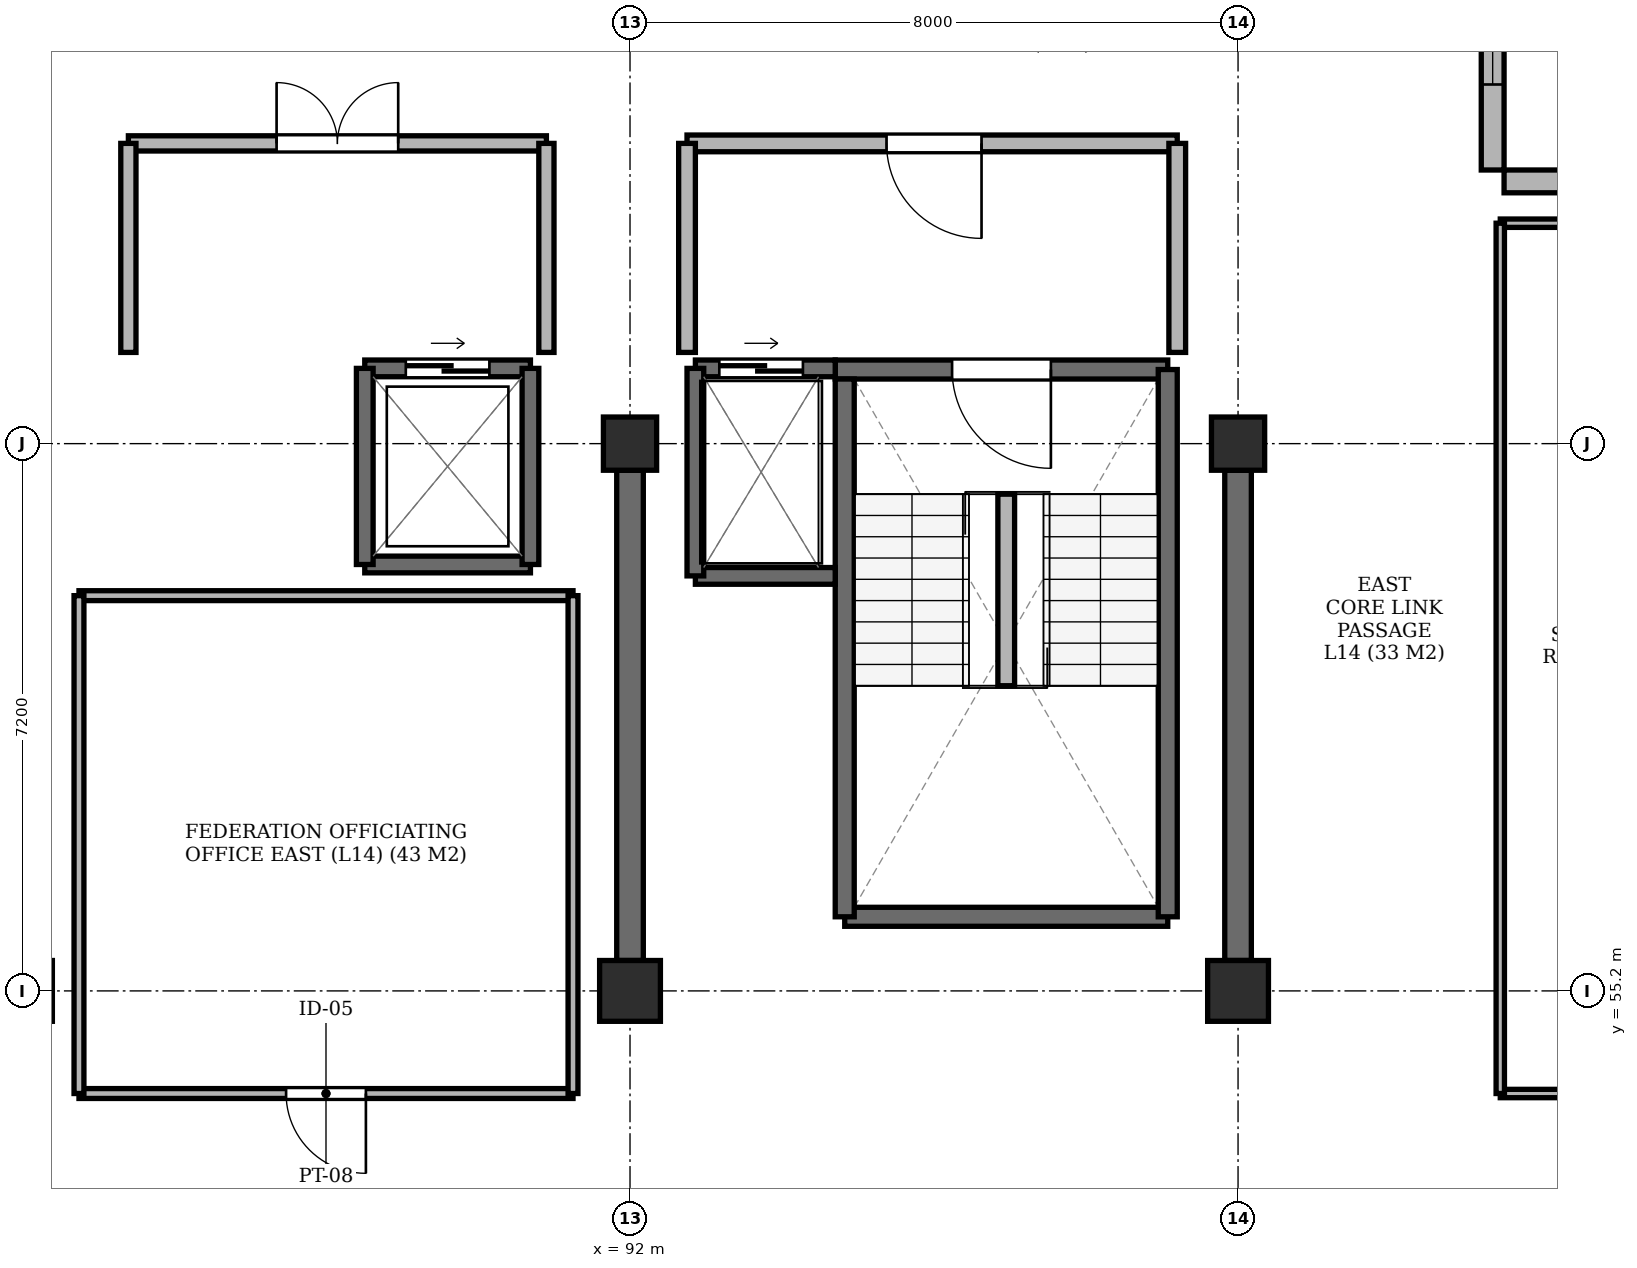
"""IFC4 building model, lengths in metres.
Left out: names, types, materials, properties, quantities, classifications, styles, units other than length and angle.
Written with IfcOpenShell. Run it as: python <this file> out.ifc"""

import sys

from ifc_helpers import new_model, si_unit, direction, frame, frame_2d, origin, origin_2d, place, context, subcontext, project, spatial, rectangle, extrude, element, fill, save


model = new_model("IFC4")
c1 = context("Model", 3, precision=1e-05, world=origin(), true_north=direction((0.0, 1.0)))
c2 = subcontext(c1, "Body", "Model", "MODEL_VIEW")
j1 = project(units=[si_unit("LENGTHUNIT", "METRE"), si_unit("PLANEANGLEUNIT", "RADIAN")], contexts=[c1])
p1 = place(None, origin())
s1 = spatial("IfcSite", under=j1, at=p1, CompositionType="ELEMENT")
p2 = place(p1, origin())
s2 = spatial("IfcBuilding", under=s1, at=p2, CompositionType="ELEMENT")
p3 = place(p2, frame((0.0, 0.0, 56.8)))
s3 = spatial("IfcBuildingStorey", under=s2, at=p3, CompositionType="ELEMENT", Elevation=56.8)
for number, where, z_axis, x_axis in (
    (1, (84.0, 55.2, -0.22), (0.0, 0.0, 1.0), (1.0, 0.0, 0.0)),
    (2, (92.0, 55.2, -0.22), (0.0, 0.0, 1.0), (1.0, 0.0, 0.0)),
):
    element("IfcColumn", number, at=place(p3, frame(where, z_axis=z_axis, x_axis=x_axis)), inside=s3, PredefinedType="COLUMN", context=c2, shape_type="SweptSolid", body=[
        extrude(rectangle(XDim=0.8, YDim=0.8, at=origin_2d()), origin(), (0.0, 0.0, 1.0), 3.26),
    ])
p4 = place(p3, frame((92.0, 62.4, -0.22), z_axis=(0.0, 0.0, 1.0), x_axis=(1.0, 0.0, 0.0)))
e3 = element("IfcColumn", 3, at=p4, inside=s3, PredefinedType="COLUMN", context=c2, shape_type="SweptSolid", body=[
    extrude(rectangle(XDim=0.7, YDim=0.7, at=origin_2d()), origin(), (0.0, 0.0, 1.0), 3.26),
])
p5 = place(p3, frame((100.0, 55.2, -0.22), z_axis=(0.0, 0.0, 1.0), x_axis=(1.0, 0.0, 0.0)))
e4 = element("IfcColumn", 4, at=p5, inside=s3, PredefinedType="COLUMN", context=c2, shape_type="SweptSolid", body=[
    extrude(rectangle(XDim=0.8, YDim=0.8, at=origin_2d()), origin(), (0.0, 0.0, 1.0), 3.26),
])
p6 = place(p3, frame((100.0, 62.4, -0.22), z_axis=(0.0, 0.0, 1.0), x_axis=(1.0, 0.0, 0.0)))
e5 = element("IfcColumn", 5, at=p6, inside=s3, PredefinedType="COLUMN", context=c2, shape_type="SweptSolid", body=[
    extrude(rectangle(XDim=0.7, YDim=0.7, at=origin_2d()), origin(), (0.0, 0.0, 1.0), 3.26),
])
for number, where, z_axis, x_axis in (
    (6, (92.0, 55.6, 0.0), (0.0, 0.0, 1.0), (0.0, 1.0, 0.0)),
    (7, (100.0, 55.6, 0.0), (0.0, 0.0, 1.0), (0.0, 1.0, 0.0)),
):
    element("IfcWall", number, at=place(p3, frame(where, z_axis=z_axis, x_axis=x_axis)), inside=s3, PredefinedType="SHEAR", context=c2, shape_type="SweptSolid", body=[
        extrude(rectangle(XDim=6.45, YDim=0.35, at=frame_2d((3.225, 0.0))), origin(), (0.0, 0.0, 1.0), 3.04),
    ])
p7 = place(p3, frame((108.0, 65.85, 0.0), z_axis=(0.0, 0.0, 1.0), x_axis=(-1.0, 0.0, 0.0)))
e8 = element("IfcWall", 8, at=p7, inside=s3, PredefinedType="SOLIDWALL", context=c2, shape_type="SweptSolid", body=[
    extrude(rectangle(XDim=4.5, YDim=0.3, at=frame_2d((2.25, 0.0))), origin(), (0.0, 0.0, 1.0), 2.53),
])
p8 = place(p7, frame((1.525, 0.0, 0.62)))
e9 = element("IfcOpeningElement", 9, at=p8, cuts=e8, PredefinedType="OPENING", context=c2, shape_type="SweptSolid", body=[
    extrude(rectangle(XDim=1.45, YDim=1.81, at=frame_2d((0.725, 0.905))), frame((0.0, 0.162, 0.0), z_axis=(0.0, -1.0, 0.0), x_axis=(1.0, 0.0, 0.0)), (0.0, 0.0, 1.0), 0.324),
])
p9 = place(p3, frame((103.35, 66.0, 0.0), z_axis=(0.0, 0.0, 1.0), x_axis=(0.0, 1.0, 0.0)))
e10 = element("IfcWall", 10, at=p9, inside=s3, PredefinedType="SOLIDWALL", context=c2, shape_type="SweptSolid", body=[
    extrude(rectangle(XDim=3.6, YDim=0.3, at=frame_2d((1.8, 0.0))), origin(), (0.0, 0.0, 1.0), 2.53),
])
p10 = place(p9, frame((1.125, 0.0, 0.62)))
e11 = element("IfcOpeningElement", 11, at=p10, cuts=e10, PredefinedType="OPENING", context=c2, shape_type="SweptSolid", body=[
    extrude(rectangle(XDim=1.35, YDim=1.8, at=frame_2d((0.675, 0.9))), frame((0.0, 0.162, 0.0), z_axis=(0.0, -1.0, 0.0), x_axis=(1.0, 0.0, 0.0)), (0.0, 0.0, 1.0), 0.324),
])
p11 = place(p3, frame((94.825, 56.175, 0.0), z_axis=(0.0, 0.0, 1.0), x_axis=(1.0, 0.0, 0.0)))
e12 = element("IfcWall", 12, at=p11, inside=s3, PredefinedType="SHEAR", context=c2, shape_type="SweptSolid", body=[
    extrude(rectangle(XDim=4.25, YDim=0.25, at=frame_2d((2.125, 0.0))), origin(), (0.0, 0.0, 1.0), 3.04),
])
p12 = place(p3, frame((99.075, 63.375, 0.0), z_axis=(0.0, 0.0, 1.0), x_axis=(-1.0, 0.0, 0.0)))
e13 = element("IfcWall", 13, at=p12, inside=s3, PredefinedType="SHEAR", context=c2, shape_type="SweptSolid", body=[
    extrude(rectangle(XDim=4.375, YDim=0.25, at=frame_2d((2.188, 0.0))), origin(), (0.0, 0.0, 1.0), 3.04),
])
p13 = place(p12, frame((1.538, 0.0, 0.0)))
e14 = element("IfcOpeningElement", 14, at=p13, cuts=e13, PredefinedType="OPENING", context=c2, shape_type="SweptSolid", body=[
    extrude(rectangle(XDim=1.3, YDim=2.2, at=frame_2d((0.65, 1.1))), frame((0.0, 0.137, 0.0), z_axis=(0.0, -1.0, 0.0), x_axis=(1.0, 0.0, 0.0)), (0.0, 0.0, 1.0), 0.274),
])
p14 = place(p3, frame((94.825, 63.25, 0.0), z_axis=(0.0, 0.0, 1.0), x_axis=(0.0, -1.0, 0.0)))
e15 = element("IfcWall", 15, at=p14, inside=s3, PredefinedType="SHEAR", context=c2, shape_type="SweptSolid", body=[
    extrude(rectangle(XDim=7.075, YDim=0.25, at=frame_2d((3.538, 0.0))), origin(), (0.0, 0.0, 1.0), 3.04),
])
p15 = place(p3, frame((99.075, 56.175, 0.0), z_axis=(0.0, 0.0, 1.0), x_axis=(0.0, 1.0, 0.0)))
e16 = element("IfcWall", 16, at=p15, inside=s3, PredefinedType="SHEAR", context=c2, shape_type="SweptSolid", body=[
    extrude(rectangle(XDim=7.2, YDim=0.25, at=frame_2d((3.6, 0.0))), origin(), (0.0, 0.0, 1.0), 3.04),
])
p16 = place(p3, frame((96.95, 59.215, 0.0), z_axis=(0.0, 0.0, 1.0), x_axis=(0.0, 1.0, 0.0)))
e17 = element("IfcWall", 17, at=p16, inside=s3, PredefinedType="PARTITIONING", context=c2, shape_type="SweptSolid", body=[
    extrude(rectangle(XDim=2.52, YDim=0.22, at=frame_2d((1.26, 0.0))), origin(), (0.0, 0.0, 1.0), 3.04),
])
p17 = place(p3, frame((92.86, 60.66, 0.0), z_axis=(0.0, 0.0, 1.0), x_axis=(1.0, 0.0, 0.0)))
e18 = element("IfcWall", 18, at=p17, inside=s3, PredefinedType="SHEAR", context=c2, shape_type="SweptSolid", body=[
    extrude(rectangle(XDim=1.84, YDim=0.22, at=frame_2d((0.92, 0.0))), origin(), (0.0, 0.0, 1.0), 3.04),
])
p18 = place(p3, frame((94.7, 63.39, 0.0), z_axis=(0.0, 0.0, 1.0), x_axis=(-1.0, 0.0, 0.0)))
e19 = element("IfcWall", 19, at=p18, inside=s3, PredefinedType="SHEAR", context=c2, shape_type="SweptSolid", body=[
    extrude(rectangle(XDim=1.84, YDim=0.22, at=frame_2d((0.92, 0.0))), origin(), (0.0, 0.0, 1.0), 3.04),
])
p19 = place(p18, frame((0.425, 0.0, 0.0)))
e20 = element("IfcOpeningElement", 20, at=p19, cuts=e19, PredefinedType="OPENING", context=c2, shape_type="SweptSolid", body=[
    extrude(rectangle(XDim=1.1, YDim=2.2, at=frame_2d((0.55, 1.1))), frame((0.0, 0.122, 0.0), z_axis=(0.0, -1.0, 0.0), x_axis=(1.0, 0.0, 0.0)), (0.0, 0.0, 1.0), 0.244),
])
p20 = place(p3, frame((92.86, 63.39, 0.0), z_axis=(0.0, 0.0, 1.0), x_axis=(0.0, -1.0, 0.0)))
e21 = element("IfcWall", 21, at=p20, inside=s3, PredefinedType="SHEAR", context=c2, shape_type="SweptSolid", body=[
    extrude(rectangle(XDim=2.73, YDim=0.22, at=frame_2d((1.365, 0.0))), origin(), (0.0, 0.0, 1.0), 3.04),
])
p21 = place(p3, frame((88.51, 60.81, 0.0), z_axis=(0.0, 0.0, 1.0), x_axis=(1.0, 0.0, 0.0)))
e22 = element("IfcWall", 22, at=p21, inside=s3, PredefinedType="SHEAR", context=c2, shape_type="SweptSolid", body=[
    extrude(rectangle(XDim=2.18, YDim=0.22, at=frame_2d((1.09, 0.0))), origin(), (0.0, 0.0, 1.0), 3.04),
])
p22 = place(p3, frame((90.69, 63.39, 0.0), z_axis=(0.0, 0.0, 1.0), x_axis=(-1.0, 0.0, 0.0)))
e23 = element("IfcWall", 23, at=p22, inside=s3, PredefinedType="SHEAR", context=c2, shape_type="SweptSolid", body=[
    extrude(rectangle(XDim=2.18, YDim=0.22, at=frame_2d((1.09, 0.0))), origin(), (0.0, 0.0, 1.0), 3.04),
])
p23 = place(p22, frame((0.54, 0.0, 0.0)))
e24 = element("IfcOpeningElement", 24, at=p23, cuts=e23, PredefinedType="OPENING", context=c2, shape_type="SweptSolid", body=[
    extrude(rectangle(XDim=1.1, YDim=2.2, at=frame_2d((0.55, 1.1))), frame((0.0, 0.122, 0.0), z_axis=(0.0, -1.0, 0.0), x_axis=(1.0, 0.0, 0.0)), (0.0, 0.0, 1.0), 0.244),
])
for number, where, z_axis, x_axis in (
    (25, (88.51, 63.39, 0.0), (0.0, 0.0, 1.0), (0.0, -1.0, 0.0)),
    (26, (90.69, 60.81, 0.0), (0.0, 0.0, 1.0), (0.0, 1.0, 0.0)),
):
    element("IfcWall", number, at=place(p3, frame(where, z_axis=z_axis, x_axis=x_axis)), inside=s3, PredefinedType="SHEAR", context=c2, shape_type="SweptSolid", body=[
        extrude(rectangle(XDim=2.58, YDim=0.22, at=frame_2d((1.29, 0.0))), origin(), (0.0, 0.0, 1.0), 3.04),
    ])
p24 = place(p3, frame((92.75, 66.35, 0.0), z_axis=(0.0, 0.0, 1.0), x_axis=(1.0, 0.0, 0.0)))
e27 = element("IfcWall", 27, at=p24, inside=s3, PredefinedType="PARTITIONING", context=c2, shape_type="SweptSolid", body=[
    extrude(rectangle(XDim=6.45, YDim=0.22, at=frame_2d((3.225, 0.0))), origin(), (0.0, 0.0, 1.0), 2.53),
])
p25 = place(p24, frame((2.625, 0.0, 0.0)))
e28 = element("IfcOpeningElement", 28, at=p25, cuts=e27, PredefinedType="OPENING", context=c2, shape_type="SweptSolid", body=[
    extrude(rectangle(XDim=1.25, YDim=2.2, at=frame_2d((0.625, 1.1))), frame((0.0, 0.122, 0.0), z_axis=(0.0, -1.0, 0.0), x_axis=(1.0, 0.0, 0.0)), (0.0, 0.0, 1.0), 0.244),
])
for number, where, z_axis, x_axis in (
    (29, (92.75, 63.6, 0.0), (0.0, 0.0, 1.0), (0.0, 1.0, 0.0)),
    (30, (99.2, 63.6, 0.0), (0.0, 0.0, 1.0), (0.0, 1.0, 0.0)),
):
    element("IfcWall", number, at=place(p3, frame(where, z_axis=z_axis, x_axis=x_axis)), inside=s3, PredefinedType="PARTITIONING", context=c2, shape_type="SweptSolid", body=[
        extrude(rectangle(XDim=2.75, YDim=0.22, at=frame_2d((1.375, 0.0))), origin(), (0.0, 0.0, 1.0), 2.53),
    ])
p26 = place(p3, frame((85.4, 66.35, 0.0), z_axis=(0.0, 0.0, 1.0), x_axis=(1.0, 0.0, 0.0)))
e31 = element("IfcWall", 31, at=p26, inside=s3, PredefinedType="PARTITIONING", context=c2, shape_type="SweptSolid", body=[
    extrude(rectangle(XDim=5.5, YDim=0.2, at=frame_2d((2.75, 0.0))), origin(), (0.0, 0.0, 1.0), 2.53),
])
p27 = place(p26, frame((1.95, 0.0, 0.0)))
e32 = element("IfcOpeningElement", 32, at=p27, cuts=e31, PredefinedType="OPENING", context=c2, shape_type="SweptSolid", body=[
    extrude(rectangle(XDim=1.6, YDim=2.2, at=frame_2d((0.8, 1.1))), frame((0.0, 0.112, 0.0), z_axis=(0.0, -1.0, 0.0), x_axis=(1.0, 0.0, 0.0)), (0.0, 0.0, 1.0), 0.224),
])
for number, where, z_axis, x_axis in (
    (33, (85.4, 63.6, 0.0), (0.0, 0.0, 1.0), (0.0, 1.0, 0.0)),
    (34, (90.9, 63.6, 0.0), (0.0, 0.0, 1.0), (0.0, 1.0, 0.0)),
):
    element("IfcWall", number, at=place(p3, frame(where, z_axis=z_axis, x_axis=x_axis)), inside=s3, PredefinedType="PARTITIONING", context=c2, shape_type="SweptSolid", body=[
        extrude(rectangle(XDim=2.75, YDim=0.2, at=frame_2d((1.375, 0.0))), origin(), (0.0, 0.0, 1.0), 2.53),
    ])
p28 = place(p3, frame((103.45, 53.85, 0.0), z_axis=(0.0, 0.0, 1.0), x_axis=(1.0, 0.0, 0.0)))
e35 = element("IfcWall", 35, at=p28, inside=s3, PredefinedType="PARTITIONING", context=c2, shape_type="SweptSolid", body=[
    extrude(rectangle(XDim=3.75, YDim=0.11, at=frame_2d((1.875, 0.0))), origin(), (0.0, 0.0, 1.0), 2.53),
])
p29 = place(p28, frame((1.3, 0.0, 0.0)))
e36 = element("IfcOpeningElement", 36, at=p29, cuts=e35, PredefinedType="OPENING", context=c2, shape_type="SweptSolid", body=[
    extrude(rectangle(XDim=1.1, YDim=2.15, at=frame_2d((0.55, 1.075))), frame((0.0, 0.067, 0.0), z_axis=(0.0, -1.0, 0.0), x_axis=(1.0, 0.0, 0.0)), (0.0, 0.0, 1.0), 0.134),
])
p30 = place(p3, frame((103.45, 65.3, 0.0), z_axis=(0.0, 0.0, 1.0), x_axis=(1.0, 0.0, 0.0)))
e37 = element("IfcWall", 37, at=p30, inside=s3, PredefinedType="PARTITIONING", context=c2, shape_type="SweptSolid", body=[
    extrude(rectangle(XDim=3.75, YDim=0.11, at=frame_2d((1.875, 0.0))), origin(), (0.0, 0.0, 1.0), 2.53),
])
p31 = place(p3, frame((103.45, 53.85, 0.0), z_axis=(0.0, 0.0, 1.0), x_axis=(0.0, 1.0, 0.0)))
e38 = element("IfcWall", 38, at=p31, inside=s3, PredefinedType="PARTITIONING", context=c2, shape_type="SweptSolid", body=[
    extrude(rectangle(XDim=11.45, YDim=0.11, at=frame_2d((5.725, 0.0))), origin(), (0.0, 0.0, 1.0), 2.53),
])
p32 = place(p3, frame((84.75, 53.85, 0.0), z_axis=(0.0, 0.0, 1.0), x_axis=(1.0, 0.0, 0.0)))
e39 = element("IfcWall", 39, at=p32, inside=s3, PredefinedType="PARTITIONING", context=c2, shape_type="SweptSolid", body=[
    extrude(rectangle(XDim=6.5, YDim=0.13, at=frame_2d((3.25, 0.0))), origin(), (0.0, 0.0, 1.0), 2.53),
])
p33 = place(p32, frame((2.725, 0.0, 0.0)))
e40 = element("IfcOpeningElement", 40, at=p33, cuts=e39, PredefinedType="OPENING", context=c2, shape_type="SweptSolid", body=[
    extrude(rectangle(XDim=1.05, YDim=2.15, at=frame_2d((0.525, 1.075))), frame((0.0, 0.077, 0.0), z_axis=(0.0, -1.0, 0.0), x_axis=(1.0, 0.0, 0.0)), (0.0, 0.0, 1.0), 0.154),
])
p34 = place(p3, frame((84.75, 60.4, 0.0), z_axis=(0.0, 0.0, 1.0), x_axis=(1.0, 0.0, 0.0)))
e41 = element("IfcWall", 41, at=p34, inside=s3, PredefinedType="PARTITIONING", context=c2, shape_type="SweptSolid", body=[
    extrude(rectangle(XDim=6.5, YDim=0.13, at=frame_2d((3.25, 0.0))), origin(), (0.0, 0.0, 1.0), 2.53),
])
for number, where, z_axis, x_axis in (
    (42, (84.75, 53.85, 0.0), (0.0, 0.0, 1.0), (0.0, 1.0, 0.0)),
    (43, (91.25, 53.85, 0.0), (0.0, 0.0, 1.0), (0.0, 1.0, 0.0)),
):
    element("IfcWall", number, at=place(p3, frame(where, z_axis=z_axis, x_axis=x_axis)), inside=s3, PredefinedType="PARTITIONING", context=c2, shape_type="SweptSolid", body=[
        extrude(rectangle(XDim=6.55, YDim=0.13, at=frame_2d((3.275, 0.0))), origin(), (0.0, 0.0, 1.0), 2.53),
    ])
p35 = place(p10, origin())
e44 = element("IfcWindow", 44, at=p35, inside=s3, PartitioningType="SINGLE_PANEL", PredefinedType="WINDOW", context=c2, shape_type="SweptSolid", body=[
    extrude(rectangle(XDim=1.35, YDim=1.8, at=frame_2d((0.675, 0.9))), frame((0.0, 0.03, 0.0), z_axis=(0.0, -1.0, 0.0), x_axis=(1.0, 0.0, 0.0)), (0.0, 0.0, 1.0), 0.06),
])
fill(e11, e44)
p36 = place(p13, origin())
e45 = element("IfcDoor", 45, at=p36, inside=s3, OperationType="SINGLE_SWING_LEFT", PredefinedType="DOOR", context=c2, shape_type="SweptSolid", body=[
    extrude(rectangle(XDim=1.3, YDim=2.2, at=frame_2d((0.65, 1.1))), frame((0.0, 0.025, 0.0), z_axis=(0.0, -1.0, 0.0), x_axis=(1.0, 0.0, 0.0)), (0.0, 0.0, 1.0), 0.05),
])
fill(e14, e45)
p37 = place(p19, origin())
e46 = element("IfcDoor", 46, at=p37, inside=s3, OperationType="SLIDING_TO_LEFT", PredefinedType="DOOR", context=c2, shape_type="SweptSolid", body=[
    extrude(rectangle(XDim=1.1, YDim=2.2, at=frame_2d((0.55, 1.1))), frame((0.0, 0.025, 0.0), z_axis=(0.0, -1.0, 0.0), x_axis=(1.0, 0.0, 0.0)), (0.0, 0.0, 1.0), 0.05),
])
fill(e20, e46)
p38 = place(p23, origin())
e47 = element("IfcDoor", 47, at=p38, inside=s3, OperationType="SLIDING_TO_LEFT", PredefinedType="DOOR", context=c2, shape_type="SweptSolid", body=[
    extrude(rectangle(XDim=1.1, YDim=2.2, at=frame_2d((0.55, 1.1))), frame((0.0, 0.025, 0.0), z_axis=(0.0, -1.0, 0.0), x_axis=(1.0, 0.0, 0.0)), (0.0, 0.0, 1.0), 0.05),
])
fill(e24, e47)
p39 = place(p25, frame((1.25, 0.0, 0.0), z_axis=(0.0, 0.0, 1.0), x_axis=(-1.0, 0.0, 0.0)))
e48 = element("IfcDoor", 48, at=p39, inside=s3, OperationType="SINGLE_SWING_RIGHT", PredefinedType="DOOR", context=c2, shape_type="SweptSolid", body=[
    extrude(rectangle(XDim=1.25, YDim=2.2, at=frame_2d((0.625, 1.1))), frame((0.0, 0.025, 0.0), z_axis=(0.0, -1.0, 0.0), x_axis=(1.0, 0.0, 0.0)), (0.0, 0.0, 1.0), 0.05),
])
fill(e28, e48)
p40 = place(p27, origin())
e49 = element("IfcDoor", 49, at=p40, inside=s3, OperationType="DOUBLE_DOOR_SINGLE_SWING", PredefinedType="DOOR", context=c2, shape_type="SweptSolid", body=[
    extrude(rectangle(XDim=1.6, YDim=2.2, at=frame_2d((0.8, 1.1))), frame((0.0, 0.025, 0.0), z_axis=(0.0, -1.0, 0.0), x_axis=(1.0, 0.0, 0.0)), (0.0, 0.0, 1.0), 0.05),
])
fill(e32, e49)
p41 = place(p33, frame((1.05, 0.0, 0.0), z_axis=(0.0, 0.0, 1.0), x_axis=(-1.0, 0.0, 0.0)))
e50 = element("IfcDoor", 50, at=p41, inside=s3, OperationType="SINGLE_SWING_RIGHT", PredefinedType="DOOR", context=c2, shape_type="SweptSolid", body=[
    extrude(rectangle(XDim=1.05, YDim=2.15, at=frame_2d((0.525, 1.075))), frame((0.0, 0.025, 0.0), z_axis=(0.0, -1.0, 0.0), x_axis=(1.0, 0.0, 0.0)), (0.0, 0.0, 1.0), 0.05),
])
fill(e40, e50)
save(model, sys.argv[1])
